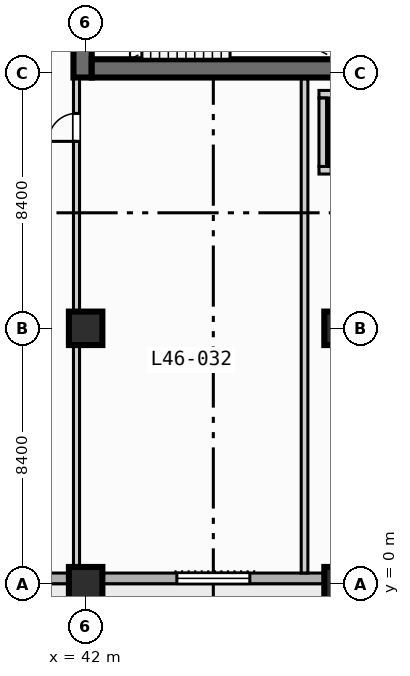
"""IFC4 building model, lengths in metres.
Left out: names, types, materials, properties, quantities, classifications, styles, units other than length and angle.
Written with IfcOpenShell. Run it as: python <this file> out.ifc"""

import sys

from ifc_helpers import new_model, si_unit, direction, frame, frame_2d, origin, origin_2d, place, context, subcontext, project, spatial, rectangle, extrude, element, fill, save


model = new_model("IFC4")
c1 = context("Model", 3, precision=1e-05, world=origin(), true_north=direction((0.0, 1.0)))
c2 = subcontext(c1, "Body", "Model", "MODEL_VIEW")
j1 = project(units=[si_unit("LENGTHUNIT", "METRE"), si_unit("PLANEANGLEUNIT", "RADIAN")], contexts=[c1])
p1 = place(None, origin())
s1 = spatial("IfcSite", under=j1, at=p1, CompositionType="ELEMENT")
p2 = place(p1, origin())
s2 = spatial("IfcBuilding", under=s1, at=p2, CompositionType="ELEMENT")
p3 = place(p2, frame((0.0, 0.0, 190.2)))
s3 = spatial("IfcBuildingStorey", under=s2, at=p3, CompositionType="ELEMENT", Elevation=190.2)
p4 = place(p3, frame((41.9, 16.65, 0.0), z_axis=(0.0, 0.0, 1.0), x_axis=(0.0, 1.0, 0.0)))
e1 = element("IfcWall", 1, at=p4, inside=s3, PredefinedType="SHEAR", context=c2, shape_type="SweptSolid", body=[
    extrude(rectangle(XDim=1.35, YDim=0.6, at=frame_2d((0.675, 0.0))), origin(), (0.0, 0.0, 1.0), 3.47),
])
p5 = place(p3, frame((42.2, 16.95, 0.0), z_axis=(0.0, 0.0, 1.0), x_axis=(1.0, 0.0, 0.0)))
e2 = element("IfcWall", 2, at=p5, inside=s3, PredefinedType="SHEAR", context=c2, shape_type="SweptSolid", body=[
    extrude(rectangle(XDim=16.35, YDim=0.6, at=frame_2d((8.175, 0.0))), origin(), (0.0, 0.0, 1.0), 3.47),
])
for number, where, z_axis, x_axis in (
    (3, (42.0, 0.0, 0.0), (0.0, 0.0, 1.0), (1.0, 0.0, 0.0)),
    (4, (42.0, 8.4, 0.0), (0.0, 0.0, 1.0), (1.0, 0.0, 0.0)),
    (5, (50.4, 0.0, 0.0), (0.0, 0.0, 1.0), (1.0, 0.0, 0.0)),
    (6, (50.4, 8.4, 0.0), (0.0, 0.0, 1.0), (1.0, 0.0, 0.0)),
):
    element("IfcColumn", number, at=place(p3, frame(where, z_axis=z_axis, x_axis=x_axis)), inside=s3, PredefinedType="COLUMN", context=c2, shape_type="SweptSolid", body=[
        extrude(rectangle(XDim=1.1, YDim=1.1, at=origin_2d()), origin(), (0.0, 0.0, 1.0), 3.7),
    ])
p6 = place(p3, frame((72.425, 0.175, 0.0), z_axis=(0.0, 0.0, 1.0), x_axis=(-1.0, 0.0, 0.0)))
e7 = element("IfcWall", 7, at=p6, inside=s3, PredefinedType="STANDARD", context=c2, shape_type="SweptSolid", body=[
    extrude(rectangle(XDim=69.25, YDim=0.35, at=frame_2d((34.625, 0.0))), origin(), (0.0, 0.0, 1.0), 3.47),
])
p7 = place(p6, frame((50.725, 0.0, 0.0)))
e8 = element("IfcOpeningElement", 8, at=p7, cuts=e7, PredefinedType="OPENING", context=c2, shape_type="SweptSolid", body=[
    extrude(rectangle(XDim=1.4, YDim=2.2, at=frame_2d((0.7, 1.1))), frame((0.0, 0.185, 0.0), z_axis=(0.0, -1.0, 0.0), x_axis=(1.0, 0.0, 0.0)), (0.0, 0.0, 1.0), 0.37),
])
p8 = place(p6, frame((58.625, 0.0, 0.85)))
e9 = element("IfcOpeningElement", 9, at=p8, cuts=e7, PredefinedType="OPENING", context=c2, shape_type="SweptSolid", body=[
    extrude(rectangle(XDim=2.4, YDim=1.95, at=frame_2d((1.2, 0.975))), frame((0.0, 0.185, 0.0), z_axis=(0.0, -1.0, 0.0), x_axis=(1.0, 0.0, 0.0)), (0.0, 0.0, 1.0), 0.37),
])
p9 = place(p6, frame((41.825, 0.0, 0.85)))
e10 = element("IfcOpeningElement", 10, at=p9, cuts=e7, PredefinedType="OPENING", context=c2, shape_type="SweptSolid", body=[
    extrude(rectangle(XDim=2.4, YDim=1.95, at=frame_2d((1.2, 0.975))), frame((0.0, 0.185, 0.0), z_axis=(0.0, -1.0, 0.0), x_axis=(1.0, 0.0, 0.0)), (0.0, 0.0, 1.0), 0.37),
])
p10 = place(p6, frame((33.725, 0.0, 0.85)))
e11 = element("IfcOpeningElement", 11, at=p10, cuts=e7, PredefinedType="OPENING", context=c2, shape_type="SweptSolid", body=[
    extrude(rectangle(XDim=1.8, YDim=1.8, at=frame_2d((0.9, 0.9))), frame((0.0, 0.185, 0.0), z_axis=(0.0, -1.0, 0.0), x_axis=(1.0, 0.0, 0.0)), (0.0, 0.0, 1.0), 0.37),
])
p11 = place(p6, frame((25.025, 0.0, 0.85)))
e12 = element("IfcOpeningElement", 12, at=p11, cuts=e7, PredefinedType="OPENING", context=c2, shape_type="SweptSolid", body=[
    extrude(rectangle(XDim=2.4, YDim=1.95, at=frame_2d((1.2, 0.975))), frame((0.0, 0.185, 0.0), z_axis=(0.0, -1.0, 0.0), x_axis=(1.0, 0.0, 0.0)), (0.0, 0.0, 1.0), 0.37),
])
p12 = place(p6, frame((64.875, 0.0, 0.85)))
e13 = element("IfcOpeningElement", 13, at=p12, cuts=e7, PredefinedType="OPENING", context=c2, shape_type="SweptSolid", body=[
    extrude(rectangle(XDim=1.8, YDim=1.8, at=frame_2d((0.9, 0.9))), frame((0.0, 0.185, 0.0), z_axis=(0.0, -1.0, 0.0), x_axis=(1.0, 0.0, 0.0)), (0.0, 0.0, 1.0), 0.37),
])
p13 = place(p3, frame((49.675, 13.6, 0.0), z_axis=(0.0, 0.0, 1.0), x_axis=(1.0, 0.0, 0.0)))
e14 = element("IfcWall", 14, at=p13, inside=s3, PredefinedType="SOLIDWALL", context=c2, shape_type="SweptSolid", body=[
    extrude(rectangle(XDim=2.25, YDim=0.25, at=frame_2d((1.125, 0.0))), origin(), (0.0, 0.0, 1.0), 3.47),
])
p14 = place(p13, frame((0.4, 0.0, 0.0)))
e15 = element("IfcOpeningElement", 15, at=p14, cuts=e14, PredefinedType="OPENING", context=c2, shape_type="SweptSolid", body=[
    extrude(rectangle(XDim=1.1, YDim=2.15, at=frame_2d((0.55, 1.075))), frame((0.0, 0.135, 0.0), z_axis=(0.0, -1.0, 0.0), x_axis=(1.0, 0.0, 0.0)), (0.0, 0.0, 1.0), 0.27),
])
for number, where, z_axis, x_axis in (
    (16, (49.675, 16.1, 0.0), (0.0, 0.0, 1.0), (1.0, 0.0, 0.0)),
    (17, (49.8, 13.725, 0.0), (0.0, 0.0, 1.0), (0.0, 1.0, 0.0)),
):
    element("IfcWall", number, at=place(p3, frame(where, z_axis=z_axis, x_axis=x_axis)), inside=s3, PredefinedType="SOLIDWALL", context=c2, shape_type="SweptSolid", body=[
        extrude(rectangle(XDim=2.25, YDim=0.25, at=frame_2d((1.125, 0.0))), origin(), (0.0, 0.0, 1.0), 3.47),
    ])
p15 = place(p3, frame((41.7, 0.35, 0.0), z_axis=(0.0, 0.0, 1.0), x_axis=(0.0, 1.0, 0.0)))
e18 = element("IfcWall", 18, at=p15, inside=s3, PredefinedType="PARTITIONING", context=c2, shape_type="SweptSolid", body=[
    extrude(rectangle(XDim=16.25, YDim=0.2, at=frame_2d((8.125, 0.0))), origin(), (0.0, 0.0, 1.0), 2.82),
])
p16 = place(p15, frame((14.2, 0.0, 0.0)))
e19 = element("IfcOpeningElement", 19, at=p16, cuts=e18, PredefinedType="OPENING", context=c2, shape_type="SweptSolid", body=[
    extrude(rectangle(XDim=0.92, YDim=2.1, at=frame_2d((0.46, 1.05))), frame((0.0, 0.11, 0.0), z_axis=(0.0, -1.0, 0.0), x_axis=(1.0, 0.0, 0.0)), (0.0, 0.0, 1.0), 0.22),
])
p17 = place(p3, frame((49.2, 0.35, 0.0), z_axis=(0.0, 0.0, 1.0), x_axis=(0.0, 1.0, 0.0)))
e20 = element("IfcWall", 20, at=p17, inside=s3, PredefinedType="PARTITIONING", context=c2, shape_type="SweptSolid", body=[
    extrude(rectangle(XDim=16.25, YDim=0.22, at=frame_2d((8.125, 0.0))), origin(), (0.0, 0.0, 1.0), 3.47),
])
p18 = place(p11, origin())
e21 = element("IfcWindow", 21, at=p18, inside=s3, PartitioningType="SINGLE_PANEL", PredefinedType="WINDOW", context=c2, shape_type="SweptSolid", body=[
    extrude(rectangle(XDim=2.4, YDim=1.95, at=frame_2d((1.2, 0.975))), frame((0.0, 0.03, 0.0), z_axis=(0.0, -1.0, 0.0), x_axis=(1.0, 0.0, 0.0)), (0.0, 0.0, 1.0), 0.06),
])
fill(e12, e21)
p19 = place(p16, origin())
e22 = element("IfcDoor", 22, at=p19, inside=s3, OperationType="SINGLE_SWING_LEFT", PredefinedType="DOOR", context=c2, shape_type="SweptSolid", body=[
    extrude(rectangle(XDim=0.92, YDim=2.1, at=frame_2d((0.46, 1.05))), frame((0.0, 0.025, 0.0), z_axis=(0.0, -1.0, 0.0), x_axis=(1.0, 0.0, 0.0)), (0.0, 0.0, 1.0), 0.05),
])
fill(e19, e22)
save(model, sys.argv[1])
